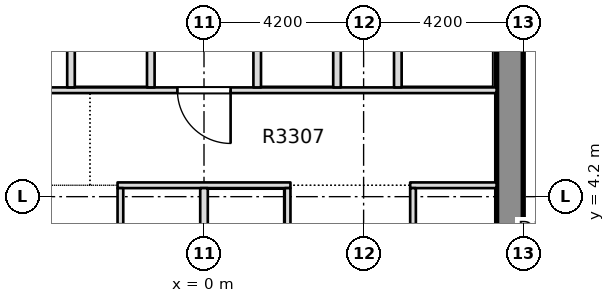
"""IFC4 building model, lengths in metres.
Left out: names, types, materials, properties, quantities, classifications, styles, units other than length and angle.
Written with IfcOpenShell. Run it as: python <this file> out.ifc"""

import sys

from ifc_helpers import new_model, si_unit, direction, frame, frame_2d, origin, place, context, subcontext, project, spatial, rectangle, extrude, element, fill, save


model = new_model("IFC4")
c1 = context("Model", 3, precision=1e-05, world=origin(), true_north=direction((0.0, 1.0)))
c2 = subcontext(c1, "Body", "Model", "MODEL_VIEW")
j1 = project(units=[si_unit("LENGTHUNIT", "METRE"), si_unit("PLANEANGLEUNIT", "RADIAN")], contexts=[c1])
p1 = place(None, origin())
s1 = spatial("IfcSite", under=j1, at=p1, CompositionType="ELEMENT")
p2 = place(p1, origin())
s2 = spatial("IfcBuilding", under=s1, at=p2, CompositionType="ELEMENT")
p3 = place(p2, frame((0.0, 0.0, 133.1)))
s3 = spatial("IfcBuildingStorey", under=s2, at=p3, CompositionType="ELEMENT", Elevation=133.1)
p4 = place(p3, frame((8.05, -8.4, -0.4), z_axis=(0.0, 0.0, 1.0), x_axis=(0.0, 1.0, 0.0)))
e1 = element("IfcWall", 1, at=p4, inside=s3, PredefinedType="SOLIDWALL", context=c2, shape_type="SweptSolid", body=[
    extrude(rectangle(XDim=30.15, YDim=0.7, at=frame_2d((15.075, 0.0))), origin(), (0.0, 0.0, 1.0), 3.45),
])
p5 = place(p4, frame((19.3, 0.0, 0.4)))
e2 = element("IfcOpeningElement", 2, at=p5, cuts=e1, PredefinedType="OPENING", context=c2, shape_type="SweptSolid", body=[
    extrude(rectangle(XDim=1.2, YDim=2.1, at=frame_2d((0.6, 1.05))), frame((0.0, 0.36, 0.0), z_axis=(0.0, -1.0, 0.0), x_axis=(1.0, 0.0, 0.0)), (0.0, 0.0, 1.0), 0.72),
])
p6 = place(p3, frame((-2.275, 4.5, 0.0), z_axis=(0.0, 0.0, 1.0), x_axis=(1.0, 0.0, 0.0)))
e3 = element("IfcWall", 3, at=p6, inside=s3, PredefinedType="PARTITIONING", context=c2, shape_type="SweptSolid", body=[
    extrude(rectangle(XDim=4.55, YDim=0.15, at=frame_2d((2.275, 0.0))), origin(), (0.0, 0.0, 1.0), 3.05),
])
p7 = place(p3, frame((5.425, 4.5, 0.0), z_axis=(0.0, 0.0, 1.0), x_axis=(1.0, 0.0, 0.0)))
e4 = element("IfcWall", 4, at=p7, inside=s3, PredefinedType="PARTITIONING", context=c2, shape_type="SweptSolid", body=[
    extrude(rectangle(XDim=2.274, YDim=0.15, at=frame_2d((1.137, 0.0))), origin(), (0.0, 0.0, 1.0), 3.05),
])
p8 = place(p3, frame((-7.699, 7.0, 0.0), z_axis=(0.0, 0.0, 1.0), x_axis=(1.0, 0.0, 0.0)))
e5 = element("IfcWall", 5, at=p8, inside=s3, PredefinedType="PARTITIONING", context=c2, shape_type="SweptSolid", body=[
    extrude(rectangle(XDim=15.398, YDim=0.15, at=frame_2d((7.699, 0.0))), origin(), (0.0, 0.0, 1.0), 3.05),
])
p9 = place(p8, frame((6.999, 0.0, 0.0)))
e6 = element("IfcOpeningElement", 6, at=p9, cuts=e5, PredefinedType="OPENING", context=c2, shape_type="SweptSolid", body=[
    extrude(rectangle(XDim=1.4, YDim=2.1, at=frame_2d((0.7, 1.05))), frame((0.0, 0.085, 0.0), z_axis=(0.0, -1.0, 0.0), x_axis=(1.0, 0.0, 0.0)), (0.0, 0.0, 1.0), 0.17),
])
p10 = place(p3, frame((-3.5, 7.075, 0.0), z_axis=(0.0, 0.0, 1.0), x_axis=(0.0, 1.0, 0.0)))
e7 = element("IfcWall", 7, at=p10, inside=s3, PredefinedType="PARTITIONING", context=c2, shape_type="SweptSolid", body=[
    extrude(rectangle(XDim=2.85, YDim=0.2, at=frame_2d((1.425, 0.0))), origin(), (0.0, 0.0, 1.0), 3.05),
])
p11 = place(p3, frame((-2.2, -7.699, 0.0), z_axis=(0.0, 0.0, 1.0), x_axis=(0.0, 1.0, 0.0)))
e8 = element("IfcWall", 8, at=p11, inside=s3, PredefinedType="PARTITIONING", context=c2, shape_type="SweptSolid", body=[
    extrude(rectangle(XDim=12.124, YDim=0.15, at=frame_2d((6.062, 0.0))), origin(), (0.0, 0.0, 1.0), 3.05),
])
p12 = place(p11, frame((1.149, 0.0, 0.0)))
e9 = element("IfcOpeningElement", 9, at=p12, cuts=e8, PredefinedType="OPENING", context=c2, shape_type="SweptSolid", body=[
    extrude(rectangle(XDim=1.1, YDim=2.1, at=frame_2d((0.55, 1.05))), frame((0.0, 0.085, 0.0), z_axis=(0.0, -1.0, 0.0), x_axis=(1.0, 0.0, 0.0)), (0.0, 0.0, 1.0), 0.17),
])
p13 = place(p11, frame((5.724, 0.0, 0.0)))
e10 = element("IfcOpeningElement", 10, at=p13, cuts=e8, PredefinedType="OPENING", context=c2, shape_type="SweptSolid", body=[
    extrude(rectangle(XDim=0.95, YDim=2.1, at=frame_2d((0.475, 1.05))), frame((0.0, 0.085, 0.0), z_axis=(0.0, -1.0, 0.0), x_axis=(1.0, 0.0, 0.0)), (0.0, 0.0, 1.0), 0.17),
])
p14 = place(p11, frame((10.224, 0.0, 0.0)))
e11 = element("IfcOpeningElement", 11, at=p14, cuts=e8, PredefinedType="OPENING", context=c2, shape_type="SweptSolid", body=[
    extrude(rectangle(XDim=0.95, YDim=2.1, at=frame_2d((0.475, 1.05))), frame((0.0, 0.085, 0.0), z_axis=(0.0, -1.0, 0.0), x_axis=(1.0, 0.0, 0.0)), (0.0, 0.0, 1.0), 0.17),
])
p15 = place(p3, frame((-1.4, 7.075, 0.0), z_axis=(0.0, 0.0, 1.0), x_axis=(0.0, 1.0, 0.0)))
e12 = element("IfcWall", 12, at=p15, inside=s3, PredefinedType="PARTITIONING", context=c2, shape_type="SweptSolid", body=[
    extrude(rectangle(XDim=2.85, YDim=0.2, at=frame_2d((1.425, 0.0))), origin(), (0.0, 0.0, 1.0), 3.05),
])
p16 = place(p3, frame((0.0, -7.699, 0.0), z_axis=(0.0, 0.0, 1.0), x_axis=(0.0, 1.0, 0.0)))
e13 = element("IfcWall", 13, at=p16, inside=s3, PredefinedType="PARTITIONING", context=c2, shape_type="SweptSolid", body=[
    extrude(rectangle(XDim=12.124, YDim=0.2, at=frame_2d((6.062, 0.0))), origin(), (0.0, 0.0, 1.0), 3.05),
])
p17 = place(p3, frame((1.4, 7.075, 0.0), z_axis=(0.0, 0.0, 1.0), x_axis=(0.0, 1.0, 0.0)))
e14 = element("IfcWall", 14, at=p17, inside=s3, PredefinedType="PARTITIONING", context=c2, shape_type="SweptSolid", body=[
    extrude(rectangle(XDim=2.85, YDim=0.2, at=frame_2d((1.425, 0.0))), origin(), (0.0, 0.0, 1.0), 3.05),
])
p18 = place(p3, frame((2.2, -7.699, 0.0), z_axis=(0.0, 0.0, 1.0), x_axis=(0.0, 1.0, 0.0)))
e15 = element("IfcWall", 15, at=p18, inside=s3, PredefinedType="PARTITIONING", context=c2, shape_type="SweptSolid", body=[
    extrude(rectangle(XDim=12.124, YDim=0.15, at=frame_2d((6.062, 0.0))), origin(), (0.0, 0.0, 1.0), 3.05),
])
p19 = place(p3, frame((3.5, 7.075, 0.0), z_axis=(0.0, 0.0, 1.0), x_axis=(0.0, 1.0, 0.0)))
e16 = element("IfcWall", 16, at=p19, inside=s3, PredefinedType="PARTITIONING", context=c2, shape_type="SweptSolid", body=[
    extrude(rectangle(XDim=2.85, YDim=0.2, at=frame_2d((1.425, 0.0))), origin(), (0.0, 0.0, 1.0), 3.05),
])
p20 = place(p3, frame((5.1, 7.075, 0.0), z_axis=(0.0, 0.0, 1.0), x_axis=(0.0, 1.0, 0.0)))
e17 = element("IfcWall", 17, at=p20, inside=s3, PredefinedType="PARTITIONING", context=c2, shape_type="SweptSolid", body=[
    extrude(rectangle(XDim=2.725, YDim=0.2, at=frame_2d((1.363, 0.0))), origin(), (0.0, 0.0, 1.0), 3.05),
])
p21 = place(p3, frame((5.5, -7.699, 0.0), z_axis=(0.0, 0.0, 1.0), x_axis=(0.0, 1.0, 0.0)))
e18 = element("IfcWall", 18, at=p21, inside=s3, PredefinedType="PARTITIONING", context=c2, shape_type="SweptSolid", body=[
    extrude(rectangle(XDim=12.124, YDim=0.15, at=frame_2d((6.062, 0.0))), origin(), (0.0, 0.0, 1.0), 3.05),
])
p22 = place(p21, frame((7.224, 0.0, 0.0)))
e19 = element("IfcOpeningElement", 19, at=p22, cuts=e18, PredefinedType="OPENING", context=c2, shape_type="SweptSolid", body=[
    extrude(rectangle(XDim=0.95, YDim=2.1, at=frame_2d((0.475, 1.05))), frame((0.0, 0.085, 0.0), z_axis=(0.0, -1.0, 0.0), x_axis=(1.0, 0.0, 0.0)), (0.0, 0.0, 1.0), 0.17),
])
p23 = place(p21, frame((10.224, 0.0, 0.0)))
e20 = element("IfcOpeningElement", 20, at=p23, cuts=e18, PredefinedType="OPENING", context=c2, shape_type="SweptSolid", body=[
    extrude(rectangle(XDim=0.95, YDim=2.1, at=frame_2d((0.475, 1.05))), frame((0.0, 0.085, 0.0), z_axis=(0.0, -1.0, 0.0), x_axis=(1.0, 0.0, 0.0)), (0.0, 0.0, 1.0), 0.17),
])
p24 = place(p9, origin())
e21 = element("IfcDoor", 21, at=p24, inside=s3, OperationType="SINGLE_SWING_RIGHT", PredefinedType="DOOR", context=c2, shape_type="SweptSolid", body=[
    extrude(rectangle(XDim=1.4, YDim=2.1, at=frame_2d((0.7, 1.05))), frame((0.0, 0.025, 0.0), z_axis=(0.0, -1.0, 0.0), x_axis=(1.0, 0.0, 0.0)), (0.0, 0.0, 1.0), 0.05),
])
fill(e6, e21)
save(model, sys.argv[1])
